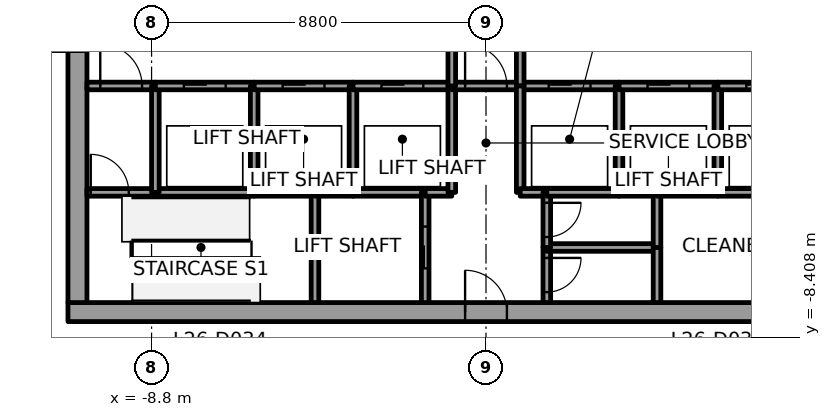
"""IFC4 building model, lengths in metres.
Left out: names, types, materials, properties, quantities, classifications, styles, units other than length and angle.
Written with IfcOpenShell. Run it as: python <this file> out.ifc"""

import sys

from ifc_helpers import new_model, si_unit, direction, frame, frame_2d, origin, place, context, subcontext, project, spatial, rectangle, extrude, element, fill, save


model = new_model("IFC4")
c1 = context("Model", 3, precision=1e-05, world=origin(), true_north=direction((0.0, 1.0)))
c2 = subcontext(c1, "Body", "Model", "MODEL_VIEW")
j1 = project(units=[si_unit("LENGTHUNIT", "METRE"), si_unit("PLANEANGLEUNIT", "RADIAN")], contexts=[c1])
p1 = place(None, origin())
s1 = spatial("IfcSite", under=j1, at=p1, CompositionType="ELEMENT")
p2 = place(p1, origin())
s2 = spatial("IfcBuilding", under=s1, at=p2, CompositionType="ELEMENT")
p3 = place(p2, frame((0.0, 0.0, 125.8)))
s3 = spatial("IfcBuildingStorey", under=s2, at=p3, CompositionType="ELEMENT", Elevation=125.8)
p4 = place(p3, frame((-11.0, -7.75, 0.0), z_axis=(0.0, 0.0, 1.0), x_axis=(1.0, 0.0, 0.0)))
e1 = element("IfcWall", 1, at=p4, inside=s3, PredefinedType="SHEAR", context=c2, shape_type="SweptSolid", body=[
    extrude(rectangle(XDim=22.0, YDim=0.5, at=frame_2d((11.0, 0.0))), origin(), (0.0, 0.0, 1.0), 4.0),
])
p5 = place(p4, frame((10.45, 0.0, 0.0)))
e2 = element("IfcOpeningElement", 2, at=p5, cuts=e1, PredefinedType="OPENING", context=c2, shape_type="SweptSolid", body=[
    extrude(rectangle(XDim=1.1, YDim=2.1, at=frame_2d((0.55, 1.05))), frame((0.0, 0.25, 0.0), z_axis=(0.0, -1.0, 0.0), x_axis=(1.0, 0.0, 0.0)), (0.0, 0.0, 1.0), 0.5),
])
p6 = place(p3, frame((-10.75, -7.5, 0.0), z_axis=(0.0, 0.0, 1.0), x_axis=(0.0, 1.0, 0.0)))
e3 = element("IfcWall", 3, at=p6, inside=s3, PredefinedType="SHEAR", context=c2, shape_type="SweptSolid", body=[
    extrude(rectangle(XDim=15.0, YDim=0.5, at=frame_2d((7.5, 0.0))), origin(), (0.0, 0.0, 1.0), 4.0),
])
p7 = place(p6, frame((6.6, 0.0, 0.0)))
e4 = element("IfcOpeningElement", 4, at=p7, cuts=e3, PredefinedType="OPENING", context=c2, shape_type="SweptSolid", body=[
    extrude(rectangle(XDim=1.8, YDim=2.1, at=frame_2d((0.9, 1.05))), frame((0.0, 0.25, 0.0), z_axis=(0.0, -1.0, 0.0), x_axis=(1.0, 0.0, 0.0)), (0.0, 0.0, 1.0), 0.5),
])
p8 = place(p3, frame((-10.5, -4.6, 0.0), z_axis=(0.0, 0.0, 1.0), x_axis=(1.0, 0.0, 0.0)))
e5 = element("IfcWall", 5, at=p8, inside=s3, PredefinedType="SOLIDWALL", context=c2, shape_type="SweptSolid", body=[
    extrude(rectangle(XDim=1.8, YDim=0.2, at=frame_2d((0.9, 0.0))), origin(), (0.0, 0.0, 1.0), 3.85),
])
p9 = place(p8, frame((0.1, 0.0, 0.0)))
e6 = element("IfcOpeningElement", 6, at=p9, cuts=e5, PredefinedType="OPENING", context=c2, shape_type="SweptSolid", body=[
    extrude(rectangle(XDim=1.0, YDim=2.1, at=frame_2d((0.5, 1.05))), frame((0.0, 0.1, 0.0), z_axis=(0.0, -1.0, 0.0), x_axis=(1.0, 0.0, 0.0)), (0.0, 0.0, 1.0), 0.2),
])
p10 = place(p3, frame((-10.5, -1.8, 0.0), z_axis=(0.0, 0.0, 1.0), x_axis=(1.0, 0.0, 0.0)))
e7 = element("IfcWall", 7, at=p10, inside=s3, PredefinedType="SOLIDWALL", context=c2, shape_type="SweptSolid", body=[
    extrude(rectangle(XDim=1.8, YDim=0.2, at=frame_2d((0.9, 0.0))), origin(), (0.0, 0.0, 1.0), 3.85),
])
p11 = place(p10, frame((0.35, 0.0, 0.0)))
e8 = element("IfcOpeningElement", 8, at=p11, cuts=e7, PredefinedType="OPENING", context=c2, shape_type="SweptSolid", body=[
    extrude(rectangle(XDim=1.1, YDim=2.1, at=frame_2d((0.55, 1.05))), frame((0.0, 0.1, 0.0), z_axis=(0.0, -1.0, 0.0), x_axis=(1.0, 0.0, 0.0)), (0.0, 0.0, 1.0), 0.2),
])
p12 = place(p3, frame((-8.7, -4.6, 0.0), z_axis=(0.0, 0.0, 1.0), x_axis=(1.0, 0.0, 0.0)))
e9 = element("IfcWall", 9, at=p12, inside=s3, PredefinedType="SOLIDWALL", context=c2, shape_type="SweptSolid", body=[
    extrude(rectangle(XDim=2.6, YDim=0.2, at=frame_2d((1.3, 0.0))), origin(), (0.0, 0.0, 1.0), 3.85),
])
p13 = place(p3, frame((-8.7, -4.6, 0.0), z_axis=(0.0, 0.0, 1.0), x_axis=(0.0, 1.0, 0.0)))
e10 = element("IfcWall", 10, at=p13, inside=s3, PredefinedType="SOLIDWALL", context=c2, shape_type="SweptSolid", body=[
    extrude(rectangle(XDim=2.8, YDim=0.2, at=frame_2d((1.4, 0.0))), origin(), (0.0, 0.0, 1.0), 3.85),
])
p14 = place(p3, frame((-8.7, -1.8, 0.0), z_axis=(0.0, 0.0, 1.0), x_axis=(1.0, 0.0, 0.0)))
e11 = element("IfcWall", 11, at=p14, inside=s3, PredefinedType="SOLIDWALL", context=c2, shape_type="SweptSolid", body=[
    extrude(rectangle(XDim=2.6, YDim=0.2, at=frame_2d((1.3, 0.0))), origin(), (0.0, 0.0, 1.0), 3.85),
])
p15 = place(p14, frame((0.75, 0.0, 0.0)))
e12 = element("IfcOpeningElement", 12, at=p15, cuts=e11, PredefinedType="OPENING", context=c2, shape_type="SweptSolid", body=[
    extrude(rectangle(XDim=1.1, YDim=2.1, at=frame_2d((0.55, 1.05))), frame((0.0, 0.1, 0.0), z_axis=(0.0, -1.0, 0.0), x_axis=(1.0, 0.0, 0.0)), (0.0, 0.0, 1.0), 0.2),
])
p16 = place(p3, frame((-6.1, -4.6, 0.0), z_axis=(0.0, 0.0, 1.0), x_axis=(1.0, 0.0, 0.0)))
e13 = element("IfcWall", 13, at=p16, inside=s3, PredefinedType="SOLIDWALL", context=c2, shape_type="SweptSolid", body=[
    extrude(rectangle(XDim=1.6, YDim=0.2, at=frame_2d((0.8, 0.0))), origin(), (0.0, 0.0, 1.0), 3.85),
])
p17 = place(p3, frame((-6.1, -4.6, 0.0), z_axis=(0.0, 0.0, 1.0), x_axis=(0.0, 1.0, 0.0)))
e14 = element("IfcWall", 14, at=p17, inside=s3, PredefinedType="SOLIDWALL", context=c2, shape_type="SweptSolid", body=[
    extrude(rectangle(XDim=2.8, YDim=0.2, at=frame_2d((1.4, 0.0))), origin(), (0.0, 0.0, 1.0), 3.85),
])
p18 = place(p3, frame((-6.1, -1.8, 0.0), z_axis=(0.0, 0.0, 1.0), x_axis=(1.0, 0.0, 0.0)))
e15 = element("IfcWall", 15, at=p18, inside=s3, PredefinedType="SOLIDWALL", context=c2, shape_type="SweptSolid", body=[
    extrude(rectangle(XDim=2.6, YDim=0.2, at=frame_2d((1.3, 0.0))), origin(), (0.0, 0.0, 1.0), 3.85),
])
p19 = place(p18, frame((0.75, 0.0, 0.0)))
e16 = element("IfcOpeningElement", 16, at=p19, cuts=e15, PredefinedType="OPENING", context=c2, shape_type="SweptSolid", body=[
    extrude(rectangle(XDim=1.1, YDim=2.1, at=frame_2d((0.55, 1.05))), frame((0.0, 0.1, 0.0), z_axis=(0.0, -1.0, 0.0), x_axis=(1.0, 0.0, 0.0)), (0.0, 0.0, 1.0), 0.2),
])
p20 = place(p3, frame((-4.5, -4.6, 0.0), z_axis=(0.0, 0.0, 1.0), x_axis=(0.0, -1.0, 0.0)))
e17 = element("IfcWall", 17, at=p20, inside=s3, PredefinedType="SOLIDWALL", context=c2, shape_type="SweptSolid", body=[
    extrude(rectangle(XDim=2.9, YDim=0.2, at=frame_2d((1.45, 0.0))), origin(), (0.0, 0.0, 1.0), 3.85),
])
p21 = place(p3, frame((-4.5, -4.6, 0.0), z_axis=(0.0, 0.0, 1.0), x_axis=(1.0, 0.0, 0.0)))
e18 = element("IfcWall", 18, at=p21, inside=s3, PredefinedType="SOLIDWALL", context=c2, shape_type="SweptSolid", body=[
    extrude(rectangle(XDim=1.0, YDim=0.2, at=frame_2d((0.5, 0.0))), origin(), (0.0, 0.0, 1.0), 3.85),
])
p22 = place(p3, frame((-3.5, -4.6, 0.0), z_axis=(0.0, 0.0, 1.0), x_axis=(1.0, 0.0, 0.0)))
e19 = element("IfcWall", 19, at=p22, inside=s3, PredefinedType="SOLIDWALL", context=c2, shape_type="SweptSolid", body=[
    extrude(rectangle(XDim=1.9, YDim=0.2, at=frame_2d((0.95, 0.0))), origin(), (0.0, 0.0, 1.0), 3.85),
])
p23 = place(p3, frame((-3.5, -4.6, 0.0), z_axis=(0.0, 0.0, 1.0), x_axis=(0.0, 1.0, 0.0)))
e20 = element("IfcWall", 20, at=p23, inside=s3, PredefinedType="SOLIDWALL", context=c2, shape_type="SweptSolid", body=[
    extrude(rectangle(XDim=2.8, YDim=0.2, at=frame_2d((1.4, 0.0))), origin(), (0.0, 0.0, 1.0), 3.85),
])
p24 = place(p3, frame((-3.5, -1.8, 0.0), z_axis=(0.0, 0.0, 1.0), x_axis=(1.0, 0.0, 0.0)))
e21 = element("IfcWall", 21, at=p24, inside=s3, PredefinedType="SOLIDWALL", context=c2, shape_type="SweptSolid", body=[
    extrude(rectangle(XDim=2.6, YDim=0.2, at=frame_2d((1.3, 0.0))), origin(), (0.0, 0.0, 1.0), 3.85),
])
p25 = place(p24, frame((0.75, 0.0, 0.0)))
e22 = element("IfcOpeningElement", 22, at=p25, cuts=e21, PredefinedType="OPENING", context=c2, shape_type="SweptSolid", body=[
    extrude(rectangle(XDim=1.1, YDim=2.1, at=frame_2d((0.55, 1.05))), frame((0.0, 0.1, 0.0), z_axis=(0.0, -1.0, 0.0), x_axis=(1.0, 0.0, 0.0)), (0.0, 0.0, 1.0), 0.2),
])
p26 = place(p3, frame((-1.6, -7.5, 0.0), z_axis=(0.0, 0.0, 1.0), x_axis=(0.0, 1.0, 0.0)))
e23 = element("IfcWall", 23, at=p26, inside=s3, PredefinedType="SOLIDWALL", context=c2, shape_type="SweptSolid", body=[
    extrude(rectangle(XDim=2.9, YDim=0.2, at=frame_2d((1.45, 0.0))), origin(), (0.0, 0.0, 1.0), 3.85),
])
p27 = place(p26, frame((0.9, 0.0, 0.0)))
e24 = element("IfcOpeningElement", 24, at=p27, cuts=e23, PredefinedType="OPENING", context=c2, shape_type="SweptSolid", body=[
    extrude(rectangle(XDim=1.1, YDim=2.1, at=frame_2d((0.55, 1.05))), frame((0.0, 0.1, 0.0), z_axis=(0.0, -1.0, 0.0), x_axis=(1.0, 0.0, 0.0)), (0.0, 0.0, 1.0), 0.2),
])
p28 = place(p3, frame((-1.6, -4.6, 0.0), z_axis=(0.0, 0.0, 1.0), x_axis=(1.0, 0.0, 0.0)))
e25 = element("IfcWall", 25, at=p28, inside=s3, PredefinedType="SOLIDWALL", context=c2, shape_type="SweptSolid", body=[
    extrude(rectangle(XDim=0.7, YDim=0.2, at=frame_2d((0.35, 0.0))), origin(), (0.0, 0.0, 1.0), 3.85),
])
p29 = place(p3, frame((-0.9, -4.6, 0.0), z_axis=(0.0, 0.0, 1.0), x_axis=(0.0, 1.0, 0.0)))
e26 = element("IfcWall", 26, at=p29, inside=s3, PredefinedType="SOLIDWALL", context=c2, shape_type="SweptSolid", body=[
    extrude(rectangle(XDim=2.8, YDim=0.2, at=frame_2d((1.4, 0.0))), origin(), (0.0, 0.0, 1.0), 3.85),
])
p30 = place(p3, frame((-0.9, -1.8, 0.0), z_axis=(0.0, 0.0, 1.0), x_axis=(1.0, 0.0, 0.0)))
e27 = element("IfcWall", 27, at=p30, inside=s3, PredefinedType="SOLIDWALL", context=c2, shape_type="SweptSolid", body=[
    extrude(rectangle(XDim=1.8, YDim=0.2, at=frame_2d((0.9, 0.0))), origin(), (0.0, 0.0, 1.0), 3.85),
])
p31 = place(p30, frame((0.35, 0.0, 0.0)))
e28 = element("IfcOpeningElement", 28, at=p31, cuts=e27, PredefinedType="OPENING", context=c2, shape_type="SweptSolid", body=[
    extrude(rectangle(XDim=1.1, YDim=2.1, at=frame_2d((0.55, 1.05))), frame((0.0, 0.1, 0.0), z_axis=(0.0, -1.0, 0.0), x_axis=(1.0, 0.0, 0.0)), (0.0, 0.0, 1.0), 0.2),
])
p32 = place(p3, frame((-0.9, 1.8, 0.0), z_axis=(0.0, 0.0, 1.0), x_axis=(0.0, -1.0, 0.0)))
e29 = element("IfcWall", 29, at=p32, inside=s3, PredefinedType="SOLIDWALL", context=c2, shape_type="SweptSolid", body=[
    extrude(rectangle(XDim=3.6, YDim=0.2, at=frame_2d((1.8, 0.0))), origin(), (0.0, 0.0, 1.0), 3.85),
])
p33 = place(p32, frame((1.05, 0.0, 0.0)))
e30 = element("IfcOpeningElement", 30, at=p33, cuts=e29, PredefinedType="OPENING", context=c2, shape_type="SweptSolid", body=[
    extrude(rectangle(XDim=1.5, YDim=2.1, at=frame_2d((0.75, 1.05))), frame((0.0, 0.1, 0.0), z_axis=(0.0, -1.0, 0.0), x_axis=(1.0, 0.0, 0.0)), (0.0, 0.0, 1.0), 0.2),
])
p34 = place(p3, frame((0.9, -1.8, 0.0), z_axis=(0.0, 0.0, 1.0), x_axis=(1.0, 0.0, 0.0)))
e31 = element("IfcWall", 31, at=p34, inside=s3, PredefinedType="SOLIDWALL", context=c2, shape_type="SweptSolid", body=[
    extrude(rectangle(XDim=2.6, YDim=0.2, at=frame_2d((1.3, 0.0))), origin(), (0.0, 0.0, 1.0), 3.85),
])
p35 = place(p34, frame((0.75, 0.0, 0.0)))
e32 = element("IfcOpeningElement", 32, at=p35, cuts=e31, PredefinedType="OPENING", context=c2, shape_type="SweptSolid", body=[
    extrude(rectangle(XDim=1.1, YDim=2.1, at=frame_2d((0.55, 1.05))), frame((0.0, 0.1, 0.0), z_axis=(0.0, -1.0, 0.0), x_axis=(1.0, 0.0, 0.0)), (0.0, 0.0, 1.0), 0.2),
])
p36 = place(p3, frame((0.9, -1.8, 0.0), z_axis=(0.0, 0.0, 1.0), x_axis=(0.0, 1.0, 0.0)))
e33 = element("IfcWall", 33, at=p36, inside=s3, PredefinedType="SOLIDWALL", context=c2, shape_type="SweptSolid", body=[
    extrude(rectangle(XDim=3.6, YDim=0.2, at=frame_2d((1.8, 0.0))), origin(), (0.0, 0.0, 1.0), 3.85),
])
p37 = place(p36, frame((1.05, 0.0, 0.0)))
e34 = element("IfcOpeningElement", 34, at=p37, cuts=e33, PredefinedType="OPENING", context=c2, shape_type="SweptSolid", body=[
    extrude(rectangle(XDim=1.5, YDim=2.1, at=frame_2d((0.75, 1.05))), frame((0.0, 0.1, 0.0), z_axis=(0.0, -1.0, 0.0), x_axis=(1.0, 0.0, 0.0)), (0.0, 0.0, 1.0), 0.2),
])
p38 = place(p3, frame((0.9, -1.8, 0.0), z_axis=(0.0, 0.0, 1.0), x_axis=(0.0, -1.0, 0.0)))
e35 = element("IfcWall", 35, at=p38, inside=s3, PredefinedType="SOLIDWALL", context=c2, shape_type="SweptSolid", body=[
    extrude(rectangle(XDim=2.8, YDim=0.2, at=frame_2d((1.4, 0.0))), origin(), (0.0, 0.0, 1.0), 3.85),
])
p39 = place(p3, frame((0.9, -4.6, 0.0), z_axis=(0.0, 0.0, 1.0), x_axis=(1.0, 0.0, 0.0)))
e36 = element("IfcWall", 36, at=p39, inside=s3, PredefinedType="SOLIDWALL", context=c2, shape_type="SweptSolid", body=[
    extrude(rectangle(XDim=0.7, YDim=0.2, at=frame_2d((0.35, 0.0))), origin(), (0.0, 0.0, 1.0), 3.85),
])
p40 = place(p3, frame((1.6, -6.05, 0.0), z_axis=(0.0, 0.0, 1.0), x_axis=(0.0, -1.0, 0.0)))
e37 = element("IfcWall", 37, at=p40, inside=s3, PredefinedType="SOLIDWALL", context=c2, shape_type="SweptSolid", body=[
    extrude(rectangle(XDim=1.45, YDim=0.2, at=frame_2d((0.725, 0.0))), origin(), (0.0, 0.0, 1.0), 3.85),
])
p41 = place(p40, frame((0.275, 0.0, 0.0)))
e38 = element("IfcOpeningElement", 38, at=p41, cuts=e37, PredefinedType="OPENING", context=c2, shape_type="SweptSolid", body=[
    extrude(rectangle(XDim=0.9, YDim=2.1, at=frame_2d((0.45, 1.05))), frame((0.0, 0.1, 0.0), z_axis=(0.0, -1.0, 0.0), x_axis=(1.0, 0.0, 0.0)), (0.0, 0.0, 1.0), 0.2),
])
p42 = place(p3, frame((4.5, -6.05, 0.0), z_axis=(0.0, 0.0, 1.0), x_axis=(-1.0, 0.0, 0.0)))
e39 = element("IfcWall", 39, at=p42, inside=s3, PredefinedType="SOLIDWALL", context=c2, shape_type="SweptSolid", body=[
    extrude(rectangle(XDim=2.9, YDim=0.2, at=frame_2d((1.45, 0.0))), origin(), (0.0, 0.0, 1.0), 3.85),
])
p43 = place(p3, frame((1.6, -4.6, 0.0), z_axis=(0.0, 0.0, 1.0), x_axis=(0.0, -1.0, 0.0)))
e40 = element("IfcWall", 40, at=p43, inside=s3, PredefinedType="SOLIDWALL", context=c2, shape_type="SweptSolid", body=[
    extrude(rectangle(XDim=1.45, YDim=0.2, at=frame_2d((0.725, 0.0))), origin(), (0.0, 0.0, 1.0), 3.85),
])
p44 = place(p43, frame((0.275, 0.0, 0.0)))
e41 = element("IfcOpeningElement", 41, at=p44, cuts=e40, PredefinedType="OPENING", context=c2, shape_type="SweptSolid", body=[
    extrude(rectangle(XDim=0.9, YDim=2.1, at=frame_2d((0.45, 1.05))), frame((0.0, 0.1, 0.0), z_axis=(0.0, -1.0, 0.0), x_axis=(1.0, 0.0, 0.0)), (0.0, 0.0, 1.0), 0.2),
])
p45 = place(p3, frame((3.5, -4.6, 0.0), z_axis=(0.0, 0.0, 1.0), x_axis=(-1.0, 0.0, 0.0)))
e42 = element("IfcWall", 42, at=p45, inside=s3, PredefinedType="SOLIDWALL", context=c2, shape_type="SweptSolid", body=[
    extrude(rectangle(XDim=1.9, YDim=0.2, at=frame_2d((0.95, 0.0))), origin(), (0.0, 0.0, 1.0), 3.85),
])
p46 = place(p3, frame((4.5, -4.6, 0.0), z_axis=(0.0, 0.0, 1.0), x_axis=(-1.0, 0.0, 0.0)))
e43 = element("IfcWall", 43, at=p46, inside=s3, PredefinedType="SOLIDWALL", context=c2, shape_type="SweptSolid", body=[
    extrude(rectangle(XDim=1.0, YDim=0.2, at=frame_2d((0.5, 0.0))), origin(), (0.0, 0.0, 1.0), 3.85),
])
p47 = place(p3, frame((3.5, -4.6, 0.0), z_axis=(0.0, 0.0, 1.0), x_axis=(0.0, 1.0, 0.0)))
e44 = element("IfcWall", 44, at=p47, inside=s3, PredefinedType="SOLIDWALL", context=c2, shape_type="SweptSolid", body=[
    extrude(rectangle(XDim=2.8, YDim=0.2, at=frame_2d((1.4, 0.0))), origin(), (0.0, 0.0, 1.0), 3.85),
])
p48 = place(p3, frame((3.5, -1.8, 0.0), z_axis=(0.0, 0.0, 1.0), x_axis=(1.0, 0.0, 0.0)))
e45 = element("IfcWall", 45, at=p48, inside=s3, PredefinedType="SOLIDWALL", context=c2, shape_type="SweptSolid", body=[
    extrude(rectangle(XDim=2.6, YDim=0.2, at=frame_2d((1.3, 0.0))), origin(), (0.0, 0.0, 1.0), 3.85),
])
p49 = place(p48, frame((0.75, 0.0, 0.0)))
e46 = element("IfcOpeningElement", 46, at=p49, cuts=e45, PredefinedType="OPENING", context=c2, shape_type="SweptSolid", body=[
    extrude(rectangle(XDim=1.1, YDim=2.1, at=frame_2d((0.55, 1.05))), frame((0.0, 0.1, 0.0), z_axis=(0.0, -1.0, 0.0), x_axis=(1.0, 0.0, 0.0)), (0.0, 0.0, 1.0), 0.2),
])
for number, where, z_axis, x_axis in (
    (47, (4.5, -6.05, 0.0), (0.0, 0.0, 1.0), (0.0, -1.0, 0.0)),
    (48, (4.5, -4.6, 0.0), (0.0, 0.0, 1.0), (0.0, -1.0, 0.0)),
):
    element("IfcWall", number, at=place(p3, frame(where, z_axis=z_axis, x_axis=x_axis)), inside=s3, PredefinedType="SOLIDWALL", context=c2, shape_type="SweptSolid", body=[
        extrude(rectangle(XDim=1.45, YDim=0.2, at=frame_2d((0.725, 0.0))), origin(), (0.0, 0.0, 1.0), 3.85),
    ])
p50 = place(p3, frame((6.1, -4.6, 0.0), z_axis=(0.0, 0.0, 1.0), x_axis=(-1.0, 0.0, 0.0)))
e49 = element("IfcWall", 49, at=p50, inside=s3, PredefinedType="SOLIDWALL", context=c2, shape_type="SweptSolid", body=[
    extrude(rectangle(XDim=1.6, YDim=0.2, at=frame_2d((0.8, 0.0))), origin(), (0.0, 0.0, 1.0), 3.85),
])
p51 = place(p3, frame((8.7, -4.6, 0.0), z_axis=(0.0, 0.0, 1.0), x_axis=(-1.0, 0.0, 0.0)))
e50 = element("IfcWall", 50, at=p51, inside=s3, PredefinedType="SOLIDWALL", context=c2, shape_type="SweptSolid", body=[
    extrude(rectangle(XDim=2.6, YDim=0.2, at=frame_2d((1.3, 0.0))), origin(), (0.0, 0.0, 1.0), 3.85),
])
p52 = place(p3, frame((6.1, -4.6, 0.0), z_axis=(0.0, 0.0, 1.0), x_axis=(0.0, 1.0, 0.0)))
e51 = element("IfcWall", 51, at=p52, inside=s3, PredefinedType="SOLIDWALL", context=c2, shape_type="SweptSolid", body=[
    extrude(rectangle(XDim=2.8, YDim=0.2, at=frame_2d((1.4, 0.0))), origin(), (0.0, 0.0, 1.0), 3.85),
])
p53 = place(p3, frame((6.1, -1.8, 0.0), z_axis=(0.0, 0.0, 1.0), x_axis=(1.0, 0.0, 0.0)))
e52 = element("IfcWall", 52, at=p53, inside=s3, PredefinedType="SOLIDWALL", context=c2, shape_type="SweptSolid", body=[
    extrude(rectangle(XDim=2.6, YDim=0.2, at=frame_2d((1.3, 0.0))), origin(), (0.0, 0.0, 1.0), 3.85),
])
p54 = place(p53, frame((0.75, 0.0, 0.0)))
e53 = element("IfcOpeningElement", 53, at=p54, cuts=e52, PredefinedType="OPENING", context=c2, shape_type="SweptSolid", body=[
    extrude(rectangle(XDim=1.1, YDim=2.1, at=frame_2d((0.55, 1.05))), frame((0.0, 0.1, 0.0), z_axis=(0.0, -1.0, 0.0), x_axis=(1.0, 0.0, 0.0)), (0.0, 0.0, 1.0), 0.2),
])
p55 = place(p15, origin())
e54 = element("IfcDoor", 54, at=p55, inside=s3, OperationType="SLIDING_TO_RIGHT", PredefinedType="DOOR", context=c2, shape_type="SweptSolid", body=[
    extrude(rectangle(XDim=1.1, YDim=2.1, at=frame_2d((0.55, 1.05))), frame((0.0, 0.025, 0.0), z_axis=(0.0, -1.0, 0.0), x_axis=(1.0, 0.0, 0.0)), (0.0, 0.0, 1.0), 0.05),
])
fill(e12, e54)
p56 = place(p19, origin())
e55 = element("IfcDoor", 55, at=p56, inside=s3, OperationType="SLIDING_TO_RIGHT", PredefinedType="DOOR", context=c2, shape_type="SweptSolid", body=[
    extrude(rectangle(XDim=1.1, YDim=2.1, at=frame_2d((0.55, 1.05))), frame((0.0, 0.025, 0.0), z_axis=(0.0, -1.0, 0.0), x_axis=(1.0, 0.0, 0.0)), (0.0, 0.0, 1.0), 0.05),
])
fill(e16, e55)
p57 = place(p25, origin())
e56 = element("IfcDoor", 56, at=p57, inside=s3, OperationType="SLIDING_TO_RIGHT", PredefinedType="DOOR", context=c2, shape_type="SweptSolid", body=[
    extrude(rectangle(XDim=1.1, YDim=2.1, at=frame_2d((0.55, 1.05))), frame((0.0, 0.025, 0.0), z_axis=(0.0, -1.0, 0.0), x_axis=(1.0, 0.0, 0.0)), (0.0, 0.0, 1.0), 0.05),
])
fill(e22, e56)
p58 = place(p35, origin())
e57 = element("IfcDoor", 57, at=p58, inside=s3, OperationType="SLIDING_TO_RIGHT", PredefinedType="DOOR", context=c2, shape_type="SweptSolid", body=[
    extrude(rectangle(XDim=1.1, YDim=2.1, at=frame_2d((0.55, 1.05))), frame((0.0, 0.025, 0.0), z_axis=(0.0, -1.0, 0.0), x_axis=(1.0, 0.0, 0.0)), (0.0, 0.0, 1.0), 0.05),
])
fill(e32, e57)
p59 = place(p49, origin())
e58 = element("IfcDoor", 58, at=p59, inside=s3, OperationType="SLIDING_TO_LEFT", PredefinedType="DOOR", context=c2, shape_type="SweptSolid", body=[
    extrude(rectangle(XDim=1.1, YDim=2.1, at=frame_2d((0.55, 1.05))), frame((0.0, 0.025, 0.0), z_axis=(0.0, -1.0, 0.0), x_axis=(1.0, 0.0, 0.0)), (0.0, 0.0, 1.0), 0.05),
])
fill(e46, e58)
p60 = place(p54, origin())
e59 = element("IfcDoor", 59, at=p60, inside=s3, OperationType="SLIDING_TO_RIGHT", PredefinedType="DOOR", context=c2, shape_type="SweptSolid", body=[
    extrude(rectangle(XDim=1.1, YDim=2.1, at=frame_2d((0.55, 1.05))), frame((0.0, 0.025, 0.0), z_axis=(0.0, -1.0, 0.0), x_axis=(1.0, 0.0, 0.0)), (0.0, 0.0, 1.0), 0.05),
])
fill(e53, e59)
p61 = place(p27, origin())
e60 = element("IfcDoor", 60, at=p61, inside=s3, OperationType="SLIDING_TO_RIGHT", PredefinedType="DOOR", context=c2, shape_type="SweptSolid", body=[
    extrude(rectangle(XDim=1.1, YDim=2.1, at=frame_2d((0.55, 1.05))), frame((0.0, 0.025, 0.0), z_axis=(0.0, -1.0, 0.0), x_axis=(1.0, 0.0, 0.0)), (0.0, 0.0, 1.0), 0.05),
])
fill(e24, e60)
p62 = place(p11, origin())
e61 = element("IfcDoor", 61, at=p62, inside=s3, OperationType="SINGLE_SWING_RIGHT", PredefinedType="DOOR", context=c2, shape_type="SweptSolid", body=[
    extrude(rectangle(XDim=1.1, YDim=2.1, at=frame_2d((0.55, 1.05))), frame((0.0, 0.025, 0.0), z_axis=(0.0, -1.0, 0.0), x_axis=(1.0, 0.0, 0.0)), (0.0, 0.0, 1.0), 0.05),
])
fill(e8, e61)
p63 = place(p31, origin())
e62 = element("IfcDoor", 62, at=p63, inside=s3, OperationType="SINGLE_SWING_LEFT", PredefinedType="DOOR", context=c2, shape_type="SweptSolid", body=[
    extrude(rectangle(XDim=1.1, YDim=2.1, at=frame_2d((0.55, 1.05))), frame((0.0, 0.025, 0.0), z_axis=(0.0, -1.0, 0.0), x_axis=(1.0, 0.0, 0.0)), (0.0, 0.0, 1.0), 0.05),
])
fill(e28, e62)
p64 = place(p9, origin())
e63 = element("IfcDoor", 63, at=p64, inside=s3, OperationType="SINGLE_SWING_LEFT", PredefinedType="DOOR", context=c2, shape_type="SweptSolid", body=[
    extrude(rectangle(XDim=1.0, YDim=2.1, at=frame_2d((0.5, 1.05))), frame((0.0, 0.025, 0.0), z_axis=(0.0, -1.0, 0.0), x_axis=(1.0, 0.0, 0.0)), (0.0, 0.0, 1.0), 0.05),
])
fill(e6, e63)
p65 = place(p41, origin())
e64 = element("IfcDoor", 64, at=p65, inside=s3, OperationType="SINGLE_SWING_RIGHT", PredefinedType="DOOR", context=c2, shape_type="SweptSolid", body=[
    extrude(rectangle(XDim=0.9, YDim=2.1, at=frame_2d((0.45, 1.05))), frame((0.0, 0.025, 0.0), z_axis=(0.0, -1.0, 0.0), x_axis=(1.0, 0.0, 0.0)), (0.0, 0.0, 1.0), 0.05),
])
fill(e38, e64)
p66 = place(p44, origin())
e65 = element("IfcDoor", 65, at=p66, inside=s3, OperationType="SINGLE_SWING_RIGHT", PredefinedType="DOOR", context=c2, shape_type="SweptSolid", body=[
    extrude(rectangle(XDim=0.9, YDim=2.1, at=frame_2d((0.45, 1.05))), frame((0.0, 0.025, 0.0), z_axis=(0.0, -1.0, 0.0), x_axis=(1.0, 0.0, 0.0)), (0.0, 0.0, 1.0), 0.05),
])
fill(e41, e65)
p67 = place(p7, origin())
e66 = element("IfcDoor", 66, at=p67, inside=s3, OperationType="DOUBLE_DOOR_SINGLE_SWING", PredefinedType="DOOR", context=c2, shape_type="SweptSolid", body=[
    extrude(rectangle(XDim=1.8, YDim=2.1, at=frame_2d((0.9, 1.05))), frame((0.0, 0.025, 0.0), z_axis=(0.0, -1.0, 0.0), x_axis=(1.0, 0.0, 0.0)), (0.0, 0.0, 1.0), 0.05),
])
fill(e4, e66)
p68 = place(p5, origin())
e67 = element("IfcDoor", 67, at=p68, inside=s3, OperationType="SINGLE_SWING_RIGHT", PredefinedType="DOOR", context=c2, shape_type="SweptSolid", body=[
    extrude(rectangle(XDim=1.1, YDim=2.1, at=frame_2d((0.55, 1.05))), frame((0.0, 0.025, 0.0), z_axis=(0.0, -1.0, 0.0), x_axis=(1.0, 0.0, 0.0)), (0.0, 0.0, 1.0), 0.05),
])
fill(e2, e67)
save(model, sys.argv[1])
